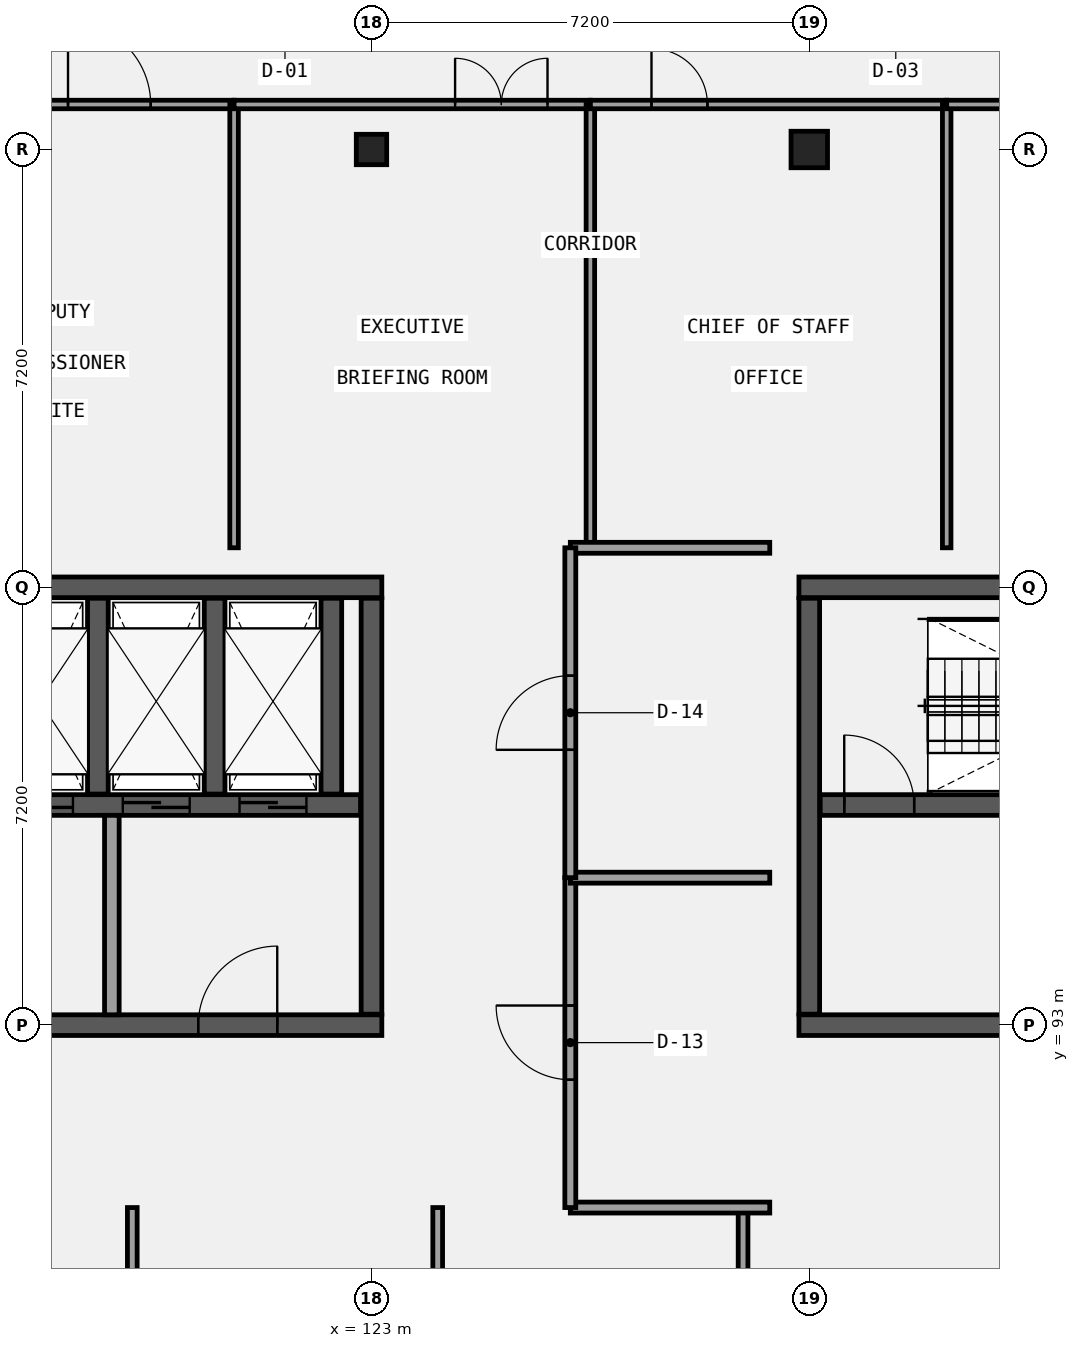
"""IFC4 building model, lengths in metres.
Left out: names, types, materials, properties, quantities, classifications, styles, units other than length and angle.
Written with IfcOpenShell. Run it as: python <this file> out.ifc"""

import sys

from ifc_helpers import new_model, si_unit, direction, frame, frame_2d, origin, origin_2d, place, context, subcontext, project, spatial, rectangle, extrude, element, fill, save


model = new_model("IFC4")
c1 = context("Model", 3, precision=1e-05, world=origin(), true_north=direction((0.0, 1.0)))
c2 = subcontext(c1, "Body", "Model", "MODEL_VIEW")
j1 = project(units=[si_unit("LENGTHUNIT", "METRE"), si_unit("PLANEANGLEUNIT", "RADIAN")], contexts=[c1])
p1 = place(None, origin())
s1 = spatial("IfcSite", under=j1, at=p1, CompositionType="ELEMENT")
p2 = place(p1, origin())
s2 = spatial("IfcBuilding", under=s1, at=p2, CompositionType="ELEMENT")
p3 = place(p2, frame((0.0, 0.0, 22.2)))
s3 = spatial("IfcBuildingStorey", under=s2, at=p3, CompositionType="ELEMENT", Elevation=22.2)
p4 = place(p3, frame((108.43, 100.2, 0.0), z_axis=(0.0, 0.0, 1.0), x_axis=(1.0, 0.0, 0.0)))
e1 = element("IfcWall", 1, at=p4, inside=s3, PredefinedType="SHEAR", context=c2, shape_type="SweptSolid", body=[
    extrude(rectangle(XDim=14.74, YDim=0.34, at=frame_2d((7.37, 0.0))), origin(), (0.0, 0.0, 1.0), 4.2),
])
p5 = place(p3, frame((108.43, 93.0, 0.0), z_axis=(0.0, 0.0, 1.0), x_axis=(1.0, 0.0, 0.0)))
e2 = element("IfcWall", 2, at=p5, inside=s3, PredefinedType="SHEAR", context=c2, shape_type="SweptSolid", body=[
    extrude(rectangle(XDim=14.74, YDim=0.34, at=frame_2d((7.37, 0.0))), origin(), (0.0, 0.0, 1.0), 4.2),
])
p6 = place(p5, frame((3.72, 0.0, 0.0)))
e3 = element("IfcOpeningElement", 3, at=p6, cuts=e2, PredefinedType="OPENING", context=c2, shape_type="SweptSolid", body=[
    extrude(rectangle(XDim=1.3, YDim=2.2, at=frame_2d((0.65, 1.1))), frame((0.0, 0.18, 0.0), z_axis=(0.0, -1.0, 0.0), x_axis=(1.0, 0.0, 0.0)), (0.0, 0.0, 1.0), 0.36),
])
p7 = place(p5, frame((11.72, 0.0, 0.0)))
e4 = element("IfcOpeningElement", 4, at=p7, cuts=e2, PredefinedType="OPENING", context=c2, shape_type="SweptSolid", body=[
    extrude(rectangle(XDim=1.3, YDim=2.2, at=frame_2d((0.65, 1.1))), frame((0.0, 0.18, 0.0), z_axis=(0.0, -1.0, 0.0), x_axis=(1.0, 0.0, 0.0)), (0.0, 0.0, 1.0), 0.36),
])
p8 = place(p3, frame((123.0, 93.18, 0.0), z_axis=(0.0, 0.0, 1.0), x_axis=(0.0, 1.0, 0.0)))
e5 = element("IfcWall", 5, at=p8, inside=s3, PredefinedType="SHEAR", context=c2, shape_type="SweptSolid", body=[
    extrude(rectangle(XDim=6.84, YDim=0.34, at=frame_2d((3.42, 0.0))), origin(), (0.0, 0.0, 1.0), 4.2),
])
p9 = place(p3, frame((108.78, 96.62, 0.0), z_axis=(0.0, 0.0, 1.0), x_axis=(1.0, 0.0, 0.0)))
e6 = element("IfcWall", 6, at=p9, inside=s3, PredefinedType="SHEAR", context=c2, shape_type="SweptSolid", body=[
    extrude(rectangle(XDim=14.04, YDim=0.34, at=frame_2d((7.02, 0.0))), origin(), (0.0, 0.0, 1.0), 4.2),
])
p10 = place(p9, frame((8.21, 0.0, 0.0)))
e7 = element("IfcOpeningElement", 7, at=p10, cuts=e6, PredefinedType="OPENING", context=c2, shape_type="SweptSolid", body=[
    extrude(rectangle(XDim=1.1, YDim=2.15, at=frame_2d((0.55, 1.075))), frame((0.0, 0.18, 0.0), z_axis=(0.0, -1.0, 0.0), x_axis=(1.0, 0.0, 0.0)), (0.0, 0.0, 1.0), 0.36),
])
p11 = place(p9, frame((10.13, 0.0, 0.0)))
e8 = element("IfcOpeningElement", 8, at=p11, cuts=e6, PredefinedType="OPENING", context=c2, shape_type="SweptSolid", body=[
    extrude(rectangle(XDim=1.1, YDim=2.15, at=frame_2d((0.55, 1.075))), frame((0.0, 0.18, 0.0), z_axis=(0.0, -1.0, 0.0), x_axis=(1.0, 0.0, 0.0)), (0.0, 0.0, 1.0), 0.36),
])
p12 = place(p9, frame((12.05, 0.0, 0.0)))
e9 = element("IfcOpeningElement", 9, at=p12, cuts=e6, PredefinedType="OPENING", context=c2, shape_type="SweptSolid", body=[
    extrude(rectangle(XDim=1.1, YDim=2.15, at=frame_2d((0.55, 1.075))), frame((0.0, 0.18, 0.0), z_axis=(0.0, -1.0, 0.0), x_axis=(1.0, 0.0, 0.0)), (0.0, 0.0, 1.0), 0.36),
])
p13 = place(p9, frame((0.395, 0.0, 0.0)))
e10 = element("IfcOpeningElement", 10, at=p13, cuts=e6, PredefinedType="OPENING", context=c2, shape_type="SweptSolid", body=[
    extrude(rectangle(XDim=1.15, YDim=2.15, at=frame_2d((0.575, 1.075))), frame((0.0, 0.18, 0.0), z_axis=(0.0, -1.0, 0.0), x_axis=(1.0, 0.0, 0.0)), (0.0, 0.0, 1.0), 0.36),
])
for number, where, z_axis, x_axis in (
    (11, (118.5, 96.8, 0.0), (0.0, 0.0, 1.0), (0.0, 1.0, 0.0)),
    (12, (120.42, 96.8, 0.0), (0.0, 0.0, 1.0), (0.0, 1.0, 0.0)),
    (13, (122.34, 96.8, 0.0), (0.0, 0.0, 1.0), (0.0, 1.0, 0.0)),
):
    element("IfcWall", number, at=place(p3, frame(where, z_axis=z_axis, x_axis=x_axis)), inside=s3, PredefinedType="SHEAR", context=c2, shape_type="SweptSolid", body=[
        extrude(rectangle(XDim=3.22, YDim=0.34, at=frame_2d((1.61, 0.0))), origin(), (0.0, 0.0, 1.0), 4.2),
    ])
p14 = place(p3, frame((130.03, 100.2, 0.0), z_axis=(0.0, 0.0, 1.0), x_axis=(1.0, 0.0, 0.0)))
e14 = element("IfcWall", 14, at=p14, inside=s3, PredefinedType="SHEAR", context=c2, shape_type="SweptSolid", body=[
    extrude(rectangle(XDim=14.74, YDim=0.34, at=frame_2d((7.37, 0.0))), origin(), (0.0, 0.0, 1.0), 4.2),
])
p15 = place(p3, frame((130.03, 93.0, 0.0), z_axis=(0.0, 0.0, 1.0), x_axis=(1.0, 0.0, 0.0)))
e15 = element("IfcWall", 15, at=p15, inside=s3, PredefinedType="SHEAR", context=c2, shape_type="SweptSolid", body=[
    extrude(rectangle(XDim=14.74, YDim=0.34, at=frame_2d((7.37, 0.0))), origin(), (0.0, 0.0, 1.0), 4.2),
])
p16 = place(p15, frame((3.72, 0.0, 0.0)))
e16 = element("IfcOpeningElement", 16, at=p16, cuts=e15, PredefinedType="OPENING", context=c2, shape_type="SweptSolid", body=[
    extrude(rectangle(XDim=1.3, YDim=2.2, at=frame_2d((0.65, 1.1))), frame((0.0, 0.18, 0.0), z_axis=(0.0, -1.0, 0.0), x_axis=(1.0, 0.0, 0.0)), (0.0, 0.0, 1.0), 0.36),
])
p17 = place(p15, frame((11.72, 0.0, 0.0)))
e17 = element("IfcOpeningElement", 17, at=p17, cuts=e15, PredefinedType="OPENING", context=c2, shape_type="SweptSolid", body=[
    extrude(rectangle(XDim=1.3, YDim=2.2, at=frame_2d((0.65, 1.1))), frame((0.0, 0.18, 0.0), z_axis=(0.0, -1.0, 0.0), x_axis=(1.0, 0.0, 0.0)), (0.0, 0.0, 1.0), 0.36),
])
p18 = place(p3, frame((130.2, 93.18, 0.0), z_axis=(0.0, 0.0, 1.0), x_axis=(0.0, 1.0, 0.0)))
e18 = element("IfcWall", 18, at=p18, inside=s3, PredefinedType="SHEAR", context=c2, shape_type="SweptSolid", body=[
    extrude(rectangle(XDim=6.84, YDim=0.34, at=frame_2d((3.42, 0.0))), origin(), (0.0, 0.0, 1.0), 4.2),
])
p19 = place(p3, frame((130.38, 96.62, 0.0), z_axis=(0.0, 0.0, 1.0), x_axis=(1.0, 0.0, 0.0)))
e19 = element("IfcWall", 19, at=p19, inside=s3, PredefinedType="SHEAR", context=c2, shape_type="SweptSolid", body=[
    extrude(rectangle(XDim=14.04, YDim=0.34, at=frame_2d((7.02, 0.0))), origin(), (0.0, 0.0, 1.0), 4.2),
])
p20 = place(p19, frame((8.21, 0.0, 0.0)))
e20 = element("IfcOpeningElement", 20, at=p20, cuts=e19, PredefinedType="OPENING", context=c2, shape_type="SweptSolid", body=[
    extrude(rectangle(XDim=1.1, YDim=2.15, at=frame_2d((0.55, 1.075))), frame((0.0, 0.18, 0.0), z_axis=(0.0, -1.0, 0.0), x_axis=(1.0, 0.0, 0.0)), (0.0, 0.0, 1.0), 0.36),
])
p21 = place(p19, frame((10.13, 0.0, 0.0)))
e21 = element("IfcOpeningElement", 21, at=p21, cuts=e19, PredefinedType="OPENING", context=c2, shape_type="SweptSolid", body=[
    extrude(rectangle(XDim=1.1, YDim=2.15, at=frame_2d((0.55, 1.075))), frame((0.0, 0.18, 0.0), z_axis=(0.0, -1.0, 0.0), x_axis=(1.0, 0.0, 0.0)), (0.0, 0.0, 1.0), 0.36),
])
p22 = place(p19, frame((12.05, 0.0, 0.0)))
e22 = element("IfcOpeningElement", 22, at=p22, cuts=e19, PredefinedType="OPENING", context=c2, shape_type="SweptSolid", body=[
    extrude(rectangle(XDim=1.1, YDim=2.15, at=frame_2d((0.55, 1.075))), frame((0.0, 0.18, 0.0), z_axis=(0.0, -1.0, 0.0), x_axis=(1.0, 0.0, 0.0)), (0.0, 0.0, 1.0), 0.36),
])
p23 = place(p19, frame((0.395, 0.0, 0.0)))
e23 = element("IfcOpeningElement", 23, at=p23, cuts=e19, PredefinedType="OPENING", context=c2, shape_type="SweptSolid", body=[
    extrude(rectangle(XDim=1.15, YDim=2.15, at=frame_2d((0.575, 1.075))), frame((0.0, 0.18, 0.0), z_axis=(0.0, -1.0, 0.0), x_axis=(1.0, 0.0, 0.0)), (0.0, 0.0, 1.0), 0.36),
])
p24 = place(p3, frame((123.0, 107.4, 0.0), z_axis=(0.0, 0.0, 1.0), x_axis=(1.0, 0.0, 0.0)))
e24 = element("IfcColumn", 24, at=p24, inside=s3, PredefinedType="COLUMN", context=c2, shape_type="SweptSolid", body=[
    extrude(rectangle(XDim=0.5, YDim=0.5, at=origin_2d()), origin(), (0.0, 0.0, 1.0), 4.2),
])
p25 = place(p3, frame((130.2, 107.4, 0.0), z_axis=(0.0, 0.0, 1.0), x_axis=(1.0, 0.0, 0.0)))
e25 = element("IfcColumn", 25, at=p25, inside=s3, PredefinedType="COLUMN", context=c2, shape_type="SweptSolid", body=[
    extrude(rectangle(XDim=0.6, YDim=0.6, at=origin_2d()), origin(), (0.0, 0.0, 1.0), 4.2),
])
p26 = place(p3, frame((118.73, 93.17, 0.0), z_axis=(0.0, 0.0, 1.0), x_axis=(0.0, 1.0, 0.0)))
e26 = element("IfcWall", 26, at=p26, inside=s3, PredefinedType="SOLIDWALL", context=c2, shape_type="SweptSolid", body=[
    extrude(rectangle(XDim=3.28, YDim=0.24, at=frame_2d((1.64, 0.0))), origin(), (0.0, 0.0, 1.0), 3.89),
])
p27 = place(p3, frame((114.88, 108.14, 0.0), z_axis=(0.0, 0.0, 1.0), x_axis=(1.0, 0.0, 0.0)))
e27 = element("IfcWall", 27, at=p27, inside=s3, PredefinedType="PARTITIONING", context=c2, shape_type="SweptSolid", body=[
    extrude(rectangle(XDim=5.86, YDim=0.14, at=frame_2d((2.93, 0.0))), origin(), (0.0, 0.0, 1.0), 3.92),
])
p28 = place(p27, frame((3.129, 0.0, 0.0)))
e28 = element("IfcOpeningElement", 28, at=p28, cuts=e27, PredefinedType="OPENING", context=c2, shape_type="SweptSolid", body=[
    extrude(rectangle(XDim=1.36, YDim=2.35, at=frame_2d((0.68, 1.175))), frame((0.0, 0.08, 0.0), z_axis=(0.0, -1.0, 0.0), x_axis=(1.0, 0.0, 0.0)), (0.0, 0.0, 1.0), 0.16),
])
p29 = place(p3, frame((120.74, 100.85, 0.0), z_axis=(0.0, 0.0, 1.0), x_axis=(0.0, 1.0, 0.0)))
e29 = element("IfcWall", 29, at=p29, inside=s3, PredefinedType="PARTITIONING", context=c2, shape_type="SweptSolid", body=[
    extrude(rectangle(XDim=7.29, YDim=0.14, at=frame_2d((3.645, 0.0))), origin(), (0.0, 0.0, 1.0), 3.92),
])
p30 = place(p3, frame((120.74, 108.14, 0.0), z_axis=(0.0, 0.0, 1.0), x_axis=(1.0, 0.0, 0.0)))
e30 = element("IfcWall", 30, at=p30, inside=s3, PredefinedType="PARTITIONING", context=c2, shape_type="SweptSolid", body=[
    extrude(rectangle(XDim=5.86, YDim=0.14, at=frame_2d((2.93, 0.0))), origin(), (0.0, 0.0, 1.0), 3.92),
])
p31 = place(p30, frame((3.635, 0.0, 0.0)))
e31 = element("IfcOpeningElement", 31, at=p31, cuts=e30, PredefinedType="OPENING", context=c2, shape_type="SweptSolid", body=[
    extrude(rectangle(XDim=1.52, YDim=2.1, at=frame_2d((0.76, 1.05))), frame((0.0, 0.08, 0.0), z_axis=(0.0, -1.0, 0.0), x_axis=(1.0, 0.0, 0.0)), (0.0, 0.0, 1.0), 0.16),
])
p32 = place(p3, frame((126.6, 100.85, 0.0), z_axis=(0.0, 0.0, 1.0), x_axis=(0.0, 1.0, 0.0)))
e32 = element("IfcWall", 32, at=p32, inside=s3, PredefinedType="PARTITIONING", context=c2, shape_type="SweptSolid", body=[
    extrude(rectangle(XDim=7.29, YDim=0.14, at=frame_2d((3.645, 0.0))), origin(), (0.0, 0.0, 1.0), 3.92),
])
p33 = place(p3, frame((126.6, 108.14, 0.0), z_axis=(0.0, 0.0, 1.0), x_axis=(1.0, 0.0, 0.0)))
e33 = element("IfcWall", 33, at=p33, inside=s3, PredefinedType="PARTITIONING", context=c2, shape_type="SweptSolid", body=[
    extrude(rectangle(XDim=5.86, YDim=0.14, at=frame_2d((2.93, 0.0))), origin(), (0.0, 0.0, 1.0), 3.92),
])
p34 = place(p33, frame((1.005, 0.0, 0.0)))
e34 = element("IfcOpeningElement", 34, at=p34, cuts=e33, PredefinedType="OPENING", context=c2, shape_type="SweptSolid", body=[
    extrude(rectangle(XDim=0.92, YDim=2.1, at=frame_2d((0.46, 1.05))), frame((0.0, 0.08, 0.0), z_axis=(0.0, -1.0, 0.0), x_axis=(1.0, 0.0, 0.0)), (0.0, 0.0, 1.0), 0.16),
])
p35 = place(p3, frame((132.46, 100.85, 0.0), z_axis=(0.0, 0.0, 1.0), x_axis=(0.0, 1.0, 0.0)))
e35 = element("IfcWall", 35, at=p35, inside=s3, PredefinedType="PARTITIONING", context=c2, shape_type="SweptSolid", body=[
    extrude(rectangle(XDim=7.29, YDim=0.14, at=frame_2d((3.645, 0.0))), origin(), (0.0, 0.0, 1.0), 3.92),
])
p36 = place(p3, frame((132.46, 108.14, 0.0), z_axis=(0.0, 0.0, 1.0), x_axis=(1.0, 0.0, 0.0)))
e36 = element("IfcWall", 36, at=p36, inside=s3, PredefinedType="PARTITIONING", context=c2, shape_type="SweptSolid", body=[
    extrude(rectangle(XDim=5.86, YDim=0.14, at=frame_2d((2.93, 0.0))), origin(), (0.0, 0.0, 1.0), 3.92),
])
p37 = place(p36, frame((1.291, 0.0, 0.0)))
e37 = element("IfcOpeningElement", 37, at=p37, cuts=e36, PredefinedType="OPENING", context=c2, shape_type="SweptSolid", body=[
    extrude(rectangle(XDim=1.52, YDim=2.35, at=frame_2d((0.76, 1.175))), frame((0.0, 0.08, 0.0), z_axis=(0.0, -1.0, 0.0), x_axis=(1.0, 0.0, 0.0)), (0.0, 0.0, 1.0), 0.16),
])
for number, where, z_axis, x_axis in (
    (38, (119.066, 81.64, 0.0), (0.0, 0.0, 1.0), (0.0, 1.0, 0.0)),
    (39, (124.089, 81.64, 0.0), (0.0, 0.0, 1.0), (0.0, 1.0, 0.0)),
    (40, (129.111, 81.64, 0.0), (0.0, 0.0, 1.0), (0.0, 1.0, 0.0)),
):
    element("IfcWall", number, at=place(p3, frame(where, z_axis=z_axis, x_axis=x_axis)), inside=s3, PredefinedType="PARTITIONING", context=c2, shape_type="SweptSolid", body=[
        extrude(rectangle(XDim=8.36, YDim=0.16, at=frame_2d((4.18, 0.0))), origin(), (0.0, 0.0, 1.0), 3.92),
    ])
for number, where, z_axis, x_axis in (
    (41, (126.27, 90.0, 0.0), (0.0, 0.0, 1.0), (1.0, 0.0, 0.0)),
    (42, (126.27, 100.85, 0.0), (0.0, 0.0, 1.0), (1.0, 0.0, 0.0)),
):
    element("IfcWall", number, at=place(p3, frame(where, z_axis=z_axis, x_axis=x_axis)), inside=s3, PredefinedType="PARTITIONING", context=c2, shape_type="SweptSolid", body=[
        extrude(rectangle(XDim=3.28, YDim=0.18, at=frame_2d((1.64, 0.0))), origin(), (0.0, 0.0, 1.0), 3.92),
    ])
p38 = place(p3, frame((126.27, 90.0, 0.0), z_axis=(0.0, 0.0, 1.0), x_axis=(0.0, 1.0, 0.0)))
e43 = element("IfcWall", 43, at=p38, inside=s3, PredefinedType="PARTITIONING", context=c2, shape_type="SweptSolid", body=[
    extrude(rectangle(XDim=5.425, YDim=0.18, at=frame_2d((2.712, 0.0))), origin(), (0.0, 0.0, 1.0), 3.92),
])
p39 = place(p38, frame((2.103, 0.0, 0.0)))
e44 = element("IfcOpeningElement", 44, at=p39, cuts=e43, PredefinedType="OPENING", context=c2, shape_type="SweptSolid", body=[
    extrude(rectangle(XDim=1.22, YDim=2.1, at=frame_2d((0.61, 1.05))), frame((0.0, 0.1, 0.0), z_axis=(0.0, -1.0, 0.0), x_axis=(1.0, 0.0, 0.0)), (0.0, 0.0, 1.0), 0.2),
])
p40 = place(p3, frame((126.27, 95.425, 0.0), z_axis=(0.0, 0.0, 1.0), x_axis=(1.0, 0.0, 0.0)))
e45 = element("IfcWall", 45, at=p40, inside=s3, PredefinedType="PARTITIONING", context=c2, shape_type="SweptSolid", body=[
    extrude(rectangle(XDim=3.28, YDim=0.18, at=frame_2d((1.64, 0.0))), origin(), (0.0, 0.0, 1.0), 3.92),
])
p41 = place(p3, frame((126.27, 95.425, 0.0), z_axis=(0.0, 0.0, 1.0), x_axis=(0.0, 1.0, 0.0)))
e46 = element("IfcWall", 46, at=p41, inside=s3, PredefinedType="PARTITIONING", context=c2, shape_type="SweptSolid", body=[
    extrude(rectangle(XDim=5.425, YDim=0.18, at=frame_2d((2.712, 0.0))), origin(), (0.0, 0.0, 1.0), 3.92),
])
p42 = place(p41, frame((2.103, 0.0, 0.0)))
e47 = element("IfcOpeningElement", 47, at=p42, cuts=e46, PredefinedType="OPENING", context=c2, shape_type="SweptSolid", body=[
    extrude(rectangle(XDim=1.22, YDim=2.22, at=frame_2d((0.61, 1.11))), frame((0.0, 0.1, 0.0), z_axis=(0.0, -1.0, 0.0), x_axis=(1.0, 0.0, 0.0)), (0.0, 0.0, 1.0), 0.2),
])
p43 = place(p10, frame((1.1, 0.0, 0.0), z_axis=(0.0, 0.0, 1.0), x_axis=(-1.0, 0.0, 0.0)))
e48 = element("IfcDoor", 48, at=p43, inside=s3, OperationType="DOUBLE_DOOR_SLIDING", PredefinedType="DOOR", context=c2, shape_type="SweptSolid", body=[
    extrude(rectangle(XDim=1.1, YDim=2.15, at=frame_2d((0.55, 1.075))), frame((0.0, 0.025, 0.0), z_axis=(0.0, -1.0, 0.0), x_axis=(1.0, 0.0, 0.0)), (0.0, 0.0, 1.0), 0.05),
])
fill(e7, e48)
p44 = place(p11, frame((1.1, 0.0, 0.0), z_axis=(0.0, 0.0, 1.0), x_axis=(-1.0, 0.0, 0.0)))
e49 = element("IfcDoor", 49, at=p44, inside=s3, OperationType="DOUBLE_DOOR_SLIDING", PredefinedType="DOOR", context=c2, shape_type="SweptSolid", body=[
    extrude(rectangle(XDim=1.1, YDim=2.15, at=frame_2d((0.55, 1.075))), frame((0.0, 0.025, 0.0), z_axis=(0.0, -1.0, 0.0), x_axis=(1.0, 0.0, 0.0)), (0.0, 0.0, 1.0), 0.05),
])
fill(e8, e49)
p45 = place(p12, frame((1.1, 0.0, 0.0), z_axis=(0.0, 0.0, 1.0), x_axis=(-1.0, 0.0, 0.0)))
e50 = element("IfcDoor", 50, at=p45, inside=s3, OperationType="DOUBLE_DOOR_SLIDING", PredefinedType="DOOR", context=c2, shape_type="SweptSolid", body=[
    extrude(rectangle(XDim=1.1, YDim=2.15, at=frame_2d((0.55, 1.075))), frame((0.0, 0.025, 0.0), z_axis=(0.0, -1.0, 0.0), x_axis=(1.0, 0.0, 0.0)), (0.0, 0.0, 1.0), 0.05),
])
fill(e9, e50)
p46 = place(p7, frame((1.3, 0.0, 0.0), z_axis=(0.0, 0.0, 1.0), x_axis=(-1.0, 0.0, 0.0)))
e51 = element("IfcDoor", 51, at=p46, inside=s3, OperationType="SINGLE_SWING_RIGHT", PredefinedType="DOOR", context=c2, shape_type="SweptSolid", body=[
    extrude(rectangle(XDim=1.3, YDim=2.2, at=frame_2d((0.65, 1.1))), frame((0.0, 0.025, 0.0), z_axis=(0.0, -1.0, 0.0), x_axis=(1.0, 0.0, 0.0)), (0.0, 0.0, 1.0), 0.05),
])
fill(e4, e51)
p47 = place(p23, origin())
e52 = element("IfcDoor", 52, at=p47, inside=s3, OperationType="SINGLE_SWING_LEFT", PredefinedType="DOOR", context=c2, shape_type="SweptSolid", body=[
    extrude(rectangle(XDim=1.15, YDim=2.15, at=frame_2d((0.575, 1.075))), frame((0.0, 0.025, 0.0), z_axis=(0.0, -1.0, 0.0), x_axis=(1.0, 0.0, 0.0)), (0.0, 0.0, 1.0), 0.05),
])
fill(e23, e52)
p48 = place(p28, frame((1.36, 0.0, 0.0), z_axis=(0.0, 0.0, 1.0), x_axis=(-1.0, 0.0, 0.0)))
e53 = element("IfcDoor", 53, at=p48, inside=s3, OperationType="SINGLE_SWING_LEFT", PredefinedType="DOOR", context=c2, shape_type="SweptSolid", body=[
    extrude(rectangle(XDim=1.36, YDim=2.35, at=frame_2d((0.68, 1.175))), frame((0.0, 0.025, 0.0), z_axis=(0.0, -1.0, 0.0), x_axis=(1.0, 0.0, 0.0)), (0.0, 0.0, 1.0), 0.05),
])
fill(e28, e53)
p49 = place(p31, frame((1.52, 0.0, 0.0), z_axis=(0.0, 0.0, 1.0), x_axis=(-1.0, 0.0, 0.0)))
e54 = element("IfcDoor", 54, at=p49, inside=s3, OperationType="DOUBLE_DOOR_SINGLE_SWING", PredefinedType="DOOR", context=c2, shape_type="SweptSolid", body=[
    extrude(rectangle(XDim=1.52, YDim=2.1, at=frame_2d((0.76, 1.05))), frame((0.0, 0.025, 0.0), z_axis=(0.0, -1.0, 0.0), x_axis=(1.0, 0.0, 0.0)), (0.0, 0.0, 1.0), 0.05),
])
fill(e31, e54)
p50 = place(p34, frame((0.92, 0.0, 0.0), z_axis=(0.0, 0.0, 1.0), x_axis=(-1.0, 0.0, 0.0)))
e55 = element("IfcDoor", 55, at=p50, inside=s3, OperationType="SINGLE_SWING_LEFT", PredefinedType="DOOR", context=c2, shape_type="SweptSolid", body=[
    extrude(rectangle(XDim=0.92, YDim=2.1, at=frame_2d((0.46, 1.05))), frame((0.0, 0.025, 0.0), z_axis=(0.0, -1.0, 0.0), x_axis=(1.0, 0.0, 0.0)), (0.0, 0.0, 1.0), 0.05),
])
fill(e34, e55)
p51 = place(p39, origin())
e56 = element("IfcDoor", 56, at=p51, inside=s3, OperationType="SINGLE_SWING_RIGHT", PredefinedType="DOOR", context=c2, shape_type="SweptSolid", body=[
    extrude(rectangle(XDim=1.22, YDim=2.1, at=frame_2d((0.61, 1.05))), frame((0.0, 0.025, 0.0), z_axis=(0.0, -1.0, 0.0), x_axis=(1.0, 0.0, 0.0)), (0.0, 0.0, 1.0), 0.05),
])
fill(e44, e56)
p52 = place(p42, origin())
e57 = element("IfcDoor", 57, at=p52, inside=s3, OperationType="SINGLE_SWING_LEFT", PredefinedType="DOOR", context=c2, shape_type="SweptSolid", body=[
    extrude(rectangle(XDim=1.22, YDim=2.22, at=frame_2d((0.61, 1.11))), frame((0.0, 0.025, 0.0), z_axis=(0.0, -1.0, 0.0), x_axis=(1.0, 0.0, 0.0)), (0.0, 0.0, 1.0), 0.05),
])
fill(e47, e57)
save(model, sys.argv[1])
